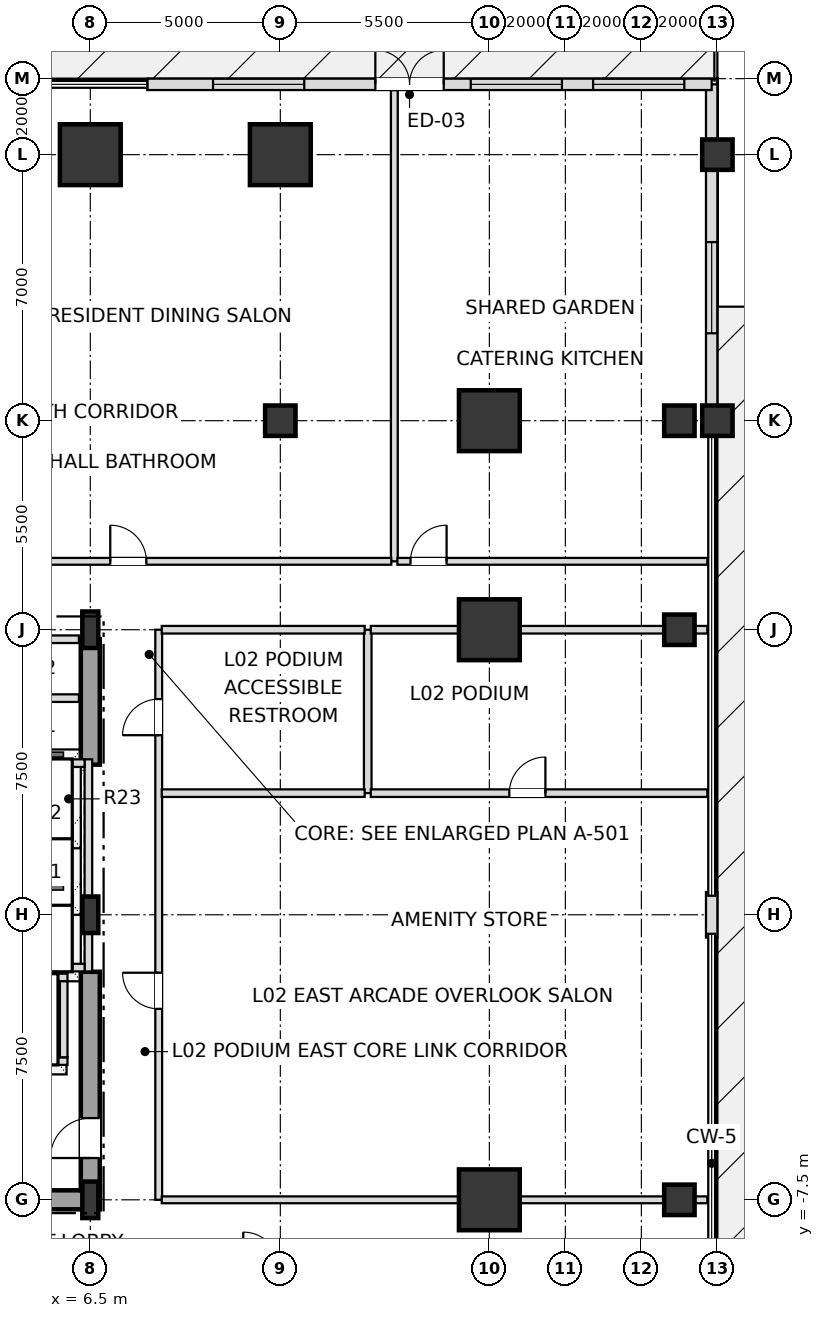
"""IFC4 building model, lengths in metres.
Left out: names, types, materials, properties, quantities, classifications, styles, units other than length and angle.
Written with IfcOpenShell. Run it as: python <this file> out.ifc"""

import sys

from ifc_helpers import new_model, si_unit, direction, frame, frame_2d, origin, origin_2d, place, context, subcontext, project, spatial, rectangle, i_section, extrude, element, fill, save


model = new_model("IFC4")
c1 = context("Model", 3, precision=1e-05, world=origin(), true_north=direction((0.0, 1.0)))
c2 = subcontext(c1, "Body", "Model", "MODEL_VIEW")
j1 = project(units=[si_unit("LENGTHUNIT", "METRE"), si_unit("PLANEANGLEUNIT", "RADIAN")], contexts=[c1])
p1 = place(None, origin())
s1 = spatial("IfcSite", under=j1, at=p1, CompositionType="ELEMENT")
p2 = place(p1, origin())
s2 = spatial("IfcBuilding", under=s1, at=p2, CompositionType="ELEMENT")
p3 = place(p2, frame((0.0, 0.0, 11.4)))
s3 = spatial("IfcBuildingStorey", under=s2, at=p3, CompositionType="ELEMENT", Elevation=11.4)
for number, where, z_axis, x_axis in (
    (1, (6.5, -7.5, 0.0), (0.0, 0.0, 1.0), (1.0, 0.0, 0.0)),
    (2, (6.5, 0.0, 0.0), (0.0, 0.0, 1.0), (1.0, 0.0, 0.0)),
    (3, (6.5, 7.5, 0.0), (0.0, 0.0, 1.0), (1.0, 0.0, 0.0)),
):
    element("IfcColumn", number, at=place(p3, frame(where, z_axis=z_axis, x_axis=x_axis)), inside=s3, PredefinedType="COLUMN", context=c2, shape_type="SweptSolid", body=[
        extrude(i_section(OverallWidth=0.42, OverallDepth=0.96, WebThickness=0.022, FlangeThickness=0.034, at=origin_2d()), origin(), (0.0, 0.0, 1.0), 5.4),
    ])
for number, where, z_axis, x_axis in (
    (4, (17.0, -7.5, 0.0), (0.0, 0.0, 1.0), (1.0, 0.0, 0.0)),
    (5, (17.0, 7.5, 0.0), (0.0, 0.0, 1.0), (1.0, 0.0, 0.0)),
    (6, (17.0, 13.0, 0.0), (0.0, 0.0, 1.0), (1.0, 0.0, 0.0)),
    (7, (11.5, 20.0, 0.0), (0.0, 0.0, 1.0), (1.0, 0.0, 0.0)),
    (8, (6.5, 20.0, 0.0), (0.0, 0.0, 1.0), (1.0, 0.0, 0.0)),
):
    element("IfcColumn", number, at=place(p3, frame(where, z_axis=z_axis, x_axis=x_axis)), inside=s3, PredefinedType="USERDEFINED", context=c2, shape_type="SweptSolid", body=[
        extrude(rectangle(XDim=1.6, YDim=1.6, at=origin_2d()), origin(), (0.0, 0.0, 1.0), 5.4),
    ])
for number, where, z_axis, x_axis in (
    (9, (23.0, 13.0, 0.0), (0.0, 0.0, 1.0), (1.0, 0.0, 0.0)),
    (10, (23.0, 20.0, 0.0), (0.0, 0.0, 1.0), (1.0, 0.0, 0.0)),
    (11, (11.5, 13.0, 0.0), (0.0, 0.0, 1.0), (1.0, 0.0, 0.0)),
    (12, (22.0, -7.5, 0.0), (0.0, 0.0, 1.0), (1.0, 0.0, 0.0)),
    (13, (22.0, 7.5, 0.0), (0.0, 0.0, 1.0), (1.0, 0.0, 0.0)),
    (14, (22.0, 13.0, 0.0), (0.0, 0.0, 1.0), (1.0, 0.0, 0.0)),
):
    element("IfcColumn", number, at=place(p3, frame(where, z_axis=z_axis, x_axis=x_axis)), inside=s3, PredefinedType="COLUMN", context=c2, shape_type="SweptSolid", body=[
        extrude(rectangle(XDim=0.8, YDim=0.8, at=origin_2d()), origin(), (0.0, 0.0, 1.0), 5.4),
    ])
p4 = place(p3, frame((22.85, -0.6, 0.0), z_axis=(0.0, 0.0, 1.0), x_axis=(0.0, 1.0, 0.0)))
e15 = element("IfcWall", 15, at=p4, inside=s3, PredefinedType="SOLIDWALL", context=c2, shape_type="SweptSolid", body=[
    extrude(rectangle(XDim=1.2, YDim=0.3, at=frame_2d((0.6, 0.0))), origin(), (0.0, 0.0, 1.0), 4.476),
])
p5 = place(p3, frame((22.85, 13.0, 0.0), z_axis=(0.0, 0.0, 1.0), x_axis=(0.0, 1.0, 0.0)))
e16 = element("IfcWall", 16, at=p5, inside=s3, PredefinedType="SOLIDWALL", context=c2, shape_type="SweptSolid", body=[
    extrude(rectangle(XDim=8.85, YDim=0.3, at=frame_2d((4.425, 0.0))), origin(), (0.0, 0.0, 1.0), 4.476),
])
p6 = place(p5, frame((2.3, 0.0, 0.8)))
e17 = element("IfcOpeningElement", 17, at=p6, cuts=e16, PredefinedType="OPENING", context=c2, shape_type="SweptSolid", body=[
    extrude(rectangle(XDim=2.4, YDim=2.2, at=frame_2d((1.2, 1.1))), frame((0.0, 0.16, 0.0), z_axis=(0.0, -1.0, 0.0), x_axis=(1.0, 0.0, 0.0)), (0.0, 0.0, 1.0), 0.32),
])
p7 = place(p3, frame((8.0, 21.85, 0.0), z_axis=(0.0, 0.0, 1.0), x_axis=(1.0, 0.0, 0.0)))
e18 = element("IfcWall", 18, at=p7, inside=s3, PredefinedType="SOLIDWALL", context=c2, shape_type="SweptSolid", body=[
    extrude(rectangle(XDim=14.85, YDim=0.3, at=frame_2d((7.425, 0.0))), origin(), (0.0, 0.0, 1.0), 5.12),
])
p8 = place(p7, frame((6.0, 0.0, 0.0)))
e19 = element("IfcOpeningElement", 19, at=p8, cuts=e18, PredefinedType="OPENING", context=c2, shape_type="SweptSolid", body=[
    extrude(rectangle(XDim=1.8, YDim=2.3, at=frame_2d((0.9, 1.15))), frame((0.0, 0.16, 0.0), z_axis=(0.0, -1.0, 0.0), x_axis=(1.0, 0.0, 0.0)), (0.0, 0.0, 1.0), 0.32),
])
p9 = place(p7, frame((1.73, 0.0, 0.8)))
e20 = element("IfcOpeningElement", 20, at=p9, cuts=e18, PredefinedType="OPENING", context=c2, shape_type="SweptSolid", body=[
    extrude(rectangle(XDim=2.4, YDim=2.2, at=frame_2d((1.2, 1.1))), frame((0.0, 0.16, 0.0), z_axis=(0.0, -1.0, 0.0), x_axis=(1.0, 0.0, 0.0)), (0.0, 0.0, 1.0), 0.32),
])
p10 = place(p7, frame((8.51, 0.0, 0.8)))
e21 = element("IfcOpeningElement", 21, at=p10, cuts=e18, PredefinedType="OPENING", context=c2, shape_type="SweptSolid", body=[
    extrude(rectangle(XDim=2.4, YDim=2.2, at=frame_2d((1.2, 1.1))), frame((0.0, 0.16, 0.0), z_axis=(0.0, -1.0, 0.0), x_axis=(1.0, 0.0, 0.0)), (0.0, 0.0, 1.0), 0.32),
])
p11 = place(p7, frame((11.73, 0.0, 0.8)))
e22 = element("IfcOpeningElement", 22, at=p11, cuts=e18, PredefinedType="OPENING", context=c2, shape_type="SweptSolid", body=[
    extrude(rectangle(XDim=2.4, YDim=2.2, at=frame_2d((1.2, 1.1))), frame((0.0, 0.16, 0.0), z_axis=(0.0, -1.0, 0.0), x_axis=(1.0, 0.0, 0.0)), (0.0, 0.0, 1.0), 0.32),
])
p12 = place(p3, frame((0.0, -7.5, 0.0), z_axis=(0.0, 0.0, 1.0), x_axis=(1.0, 0.0, 0.0)))
e23 = element("IfcWall", 23, at=p12, inside=s3, PredefinedType="SHEAR", context=c2, shape_type="SweptSolid", body=[
    extrude(rectangle(XDim=6.75, YDim=0.5, at=frame_2d((3.375, 0.0))), origin(), (0.0, 0.0, 1.0), 5.12),
])
p13 = place(p3, frame((6.5, -7.25, 0.0), z_axis=(0.0, 0.0, 1.0), x_axis=(0.0, 1.0, 0.0)))
e24 = element("IfcWall", 24, at=p13, inside=s3, PredefinedType="SHEAR", context=c2, shape_type="SweptSolid", body=[
    extrude(rectangle(XDim=5.75, YDim=0.5, at=frame_2d((2.875, 0.0))), origin(), (0.0, 0.0, 1.0), 5.12),
])
p14 = place(p13, frame((0.85, 0.0, 0.0)))
e25 = element("IfcOpeningElement", 25, at=p14, cuts=e24, PredefinedType="OPENING", context=c2, shape_type="SweptSolid", body=[
    extrude(rectangle(XDim=1.05, YDim=2.15, at=frame_2d((0.525, 1.075))), frame((0.0, 0.26, 0.0), z_axis=(0.0, -1.0, 0.0), x_axis=(1.0, 0.0, 0.0)), (0.0, 0.0, 1.0), 0.52),
])
p15 = place(p3, frame((6.5, 3.95, 0.0), z_axis=(0.0, 0.0, 1.0), x_axis=(0.0, 1.0, 0.0)))
e26 = element("IfcWall", 26, at=p15, inside=s3, PredefinedType="SHEAR", context=c2, shape_type="SweptSolid", body=[
    extrude(rectangle(XDim=3.3, YDim=0.5, at=frame_2d((1.65, 0.0))), origin(), (0.0, 0.0, 1.0), 5.12),
])
p16 = place(p3, frame((6.45, -1.49, 0.0), z_axis=(0.0, 0.0, 1.0), x_axis=(0.0, 1.0, 0.0)))
e27 = element("IfcWall", 27, at=p16, inside=s3, PredefinedType="SOLIDWALL", context=c2, shape_type="SweptSolid", body=[
    extrude(rectangle(XDim=5.58, YDim=0.2, at=frame_2d((2.79, 0.0))), origin(), (0.0, 0.0, 1.0), 4.41),
])
for number, where, z_axis, x_axis in (
    (28, (4.15, -1.39, 0.0), (0.0, 0.0, 1.0), (1.0, 0.0, 0.0)),
    (29, (4.15, 3.99, 0.0), (0.0, 0.0, 1.0), (1.0, 0.0, 0.0)),
):
    element("IfcWall", number, at=place(p3, frame(where, z_axis=z_axis, x_axis=x_axis)), inside=s3, PredefinedType="SOLIDWALL", context=c2, shape_type="SweptSolid", body=[
        extrude(rectangle(XDim=2.2, YDim=0.2, at=frame_2d((1.1, 0.0))), origin(), (0.0, 0.0, 1.0), 5.12),
    ])
p17 = place(p3, frame((1.8, -3.85, 0.0), z_axis=(0.0, 0.0, 1.0), x_axis=(1.0, 0.0, 0.0)))
e30 = element("IfcWall", 30, at=p17, inside=s3, PredefinedType="SOLIDWALL", context=c2, shape_type="SweptSolid", body=[
    extrude(rectangle(XDim=4.1, YDim=0.2, at=frame_2d((2.05, 0.0))), origin(), (0.0, 0.0, 1.0), 5.12),
])
p18 = place(p17, frame((0.45, 0.0, 0.0)))
e31 = element("IfcOpeningElement", 31, at=p18, cuts=e30, PredefinedType="OPENING", context=c2, shape_type="SweptSolid", body=[
    extrude(rectangle(XDim=1.2, YDim=2.2, at=frame_2d((0.6, 1.1))), frame((0.0, 0.11, 0.0), z_axis=(0.0, -1.0, 0.0), x_axis=(1.0, 0.0, 0.0)), (0.0, 0.0, 1.0), 0.22),
])
p19 = place(p17, frame((2.45, 0.0, 0.0)))
e32 = element("IfcOpeningElement", 32, at=p19, cuts=e30, PredefinedType="OPENING", context=c2, shape_type="SweptSolid", body=[
    extrude(rectangle(XDim=1.2, YDim=2.2, at=frame_2d((0.6, 1.1))), frame((0.0, 0.11, 0.0), z_axis=(0.0, -1.0, 0.0), x_axis=(1.0, 0.0, 0.0)), (0.0, 0.0, 1.0), 0.22),
])
p20 = place(p3, frame((1.8, -1.65, 0.0), z_axis=(0.0, 0.0, 1.0), x_axis=(1.0, 0.0, 0.0)))
e33 = element("IfcWall", 33, at=p20, inside=s3, PredefinedType="SOLIDWALL", context=c2, shape_type="SweptSolid", body=[
    extrude(rectangle(XDim=4.1, YDim=0.2, at=frame_2d((2.05, 0.0))), origin(), (0.0, 0.0, 1.0), 5.12),
])
p21 = place(p3, frame((5.8, -3.75, 0.0), z_axis=(0.0, 0.0, 1.0), x_axis=(0.0, 1.0, 0.0)))
e34 = element("IfcWall", 34, at=p21, inside=s3, PredefinedType="SOLIDWALL", context=c2, shape_type="SweptSolid", body=[
    extrude(rectangle(XDim=2.0, YDim=0.2, at=frame_2d((1.0, 0.0))), origin(), (0.0, 0.0, 1.0), 5.12),
])
p22 = place(p3, frame((8.3, -7.5, 0.0), z_axis=(0.0, 0.0, 1.0), x_axis=(0.0, 1.0, 0.0)))
e35 = element("IfcWall", 35, at=p22, inside=s3, PredefinedType="PARTITIONING", context=c2, shape_type="SweptSolid", body=[
    extrude(rectangle(XDim=15.0, YDim=0.18, at=frame_2d((7.5, 0.0))), origin(), (0.0, 0.0, 1.0), 5.12),
])
p23 = place(p22, frame((5.025, 0.0, 0.0)))
e36 = element("IfcOpeningElement", 36, at=p23, cuts=e35, PredefinedType="OPENING", context=c2, shape_type="SweptSolid", body=[
    extrude(rectangle(XDim=0.95, YDim=2.15, at=frame_2d((0.475, 1.075))), frame((0.0, 0.1, 0.0), z_axis=(0.0, -1.0, 0.0), x_axis=(1.0, 0.0, 0.0)), (0.0, 0.0, 1.0), 0.2),
])
p24 = place(p22, frame((12.225, 0.0, 0.0)))
e37 = element("IfcOpeningElement", 37, at=p24, cuts=e35, PredefinedType="OPENING", context=c2, shape_type="SweptSolid", body=[
    extrude(rectangle(XDim=0.95, YDim=2.15, at=frame_2d((0.475, 1.075))), frame((0.0, 0.1, 0.0), z_axis=(0.0, -1.0, 0.0), x_axis=(1.0, 0.0, 0.0)), (0.0, 0.0, 1.0), 0.2),
])
p25 = place(p3, frame((13.8, 3.2, 0.0), z_axis=(0.0, 0.0, 1.0), x_axis=(0.0, 1.0, 0.0)))
e38 = element("IfcWall", 38, at=p25, inside=s3, PredefinedType="SOLIDWALL", context=c2, shape_type="SweptSolid", body=[
    extrude(rectangle(XDim=4.3, YDim=0.2, at=frame_2d((2.15, 0.0))), origin(), (0.0, 0.0, 1.0), 5.12),
])
p26 = place(p3, frame((14.5, 9.3, 0.0), z_axis=(0.0, 0.0, 1.0), x_axis=(0.0, 1.0, 0.0)))
e39 = element("IfcWall", 39, at=p26, inside=s3, PredefinedType="PARTITIONING", context=c2, shape_type="SweptSolid", body=[
    extrude(rectangle(XDim=12.395, YDim=0.18, at=frame_2d((6.198, 0.0))), origin(), (0.0, 0.0, 1.0), 4.41),
])
p27 = place(p3, frame((8.38, -7.5, 0.0), z_axis=(0.0, 0.0, 1.0), x_axis=(1.0, 0.0, 0.0)))
e40 = element("IfcWall", 40, at=p27, inside=s3, PredefinedType="PARTITIONING", context=c2, shape_type="SweptSolid", body=[
    extrude(rectangle(XDim=14.355, YDim=0.18, at=frame_2d((7.178, 0.0))), origin(), (0.0, 0.0, 1.0), 4.41),
])
p28 = place(p3, frame((8.38, 3.2, 0.0), z_axis=(0.0, 0.0, 1.0), x_axis=(1.0, 0.0, 0.0)))
e41 = element("IfcWall", 41, at=p28, inside=s3, PredefinedType="SOLIDWALL", context=c2, shape_type="SweptSolid", body=[
    extrude(rectangle(XDim=5.34, YDim=0.2, at=frame_2d((2.67, 0.0))), origin(), (0.0, 0.0, 1.0), 4.642),
])
p29 = place(p3, frame((13.88, 3.2, 0.0), z_axis=(0.0, 0.0, 1.0), x_axis=(1.0, 0.0, 0.0)))
e42 = element("IfcWall", 42, at=p29, inside=s3, PredefinedType="SOLIDWALL", context=c2, shape_type="SweptSolid", body=[
    extrude(rectangle(XDim=8.855, YDim=0.2, at=frame_2d((4.428, 0.0))), origin(), (0.0, 0.0, 1.0), 4.41),
])
p30 = place(p29, frame((3.645, 0.0, 0.0)))
e43 = element("IfcOpeningElement", 43, at=p30, cuts=e42, PredefinedType="OPENING", context=c2, shape_type="SweptSolid", body=[
    extrude(rectangle(XDim=0.95, YDim=2.15, at=frame_2d((0.475, 1.075))), frame((0.0, 0.11, 0.0), z_axis=(0.0, -1.0, 0.0), x_axis=(1.0, 0.0, 0.0)), (0.0, 0.0, 1.0), 0.22),
])
p31 = place(p3, frame((4.13, 5.7, 0.0), z_axis=(0.0, 0.0, 1.0), x_axis=(1.0, 0.0, 0.0)))
e44 = element("IfcWall", 44, at=p31, inside=s3, PredefinedType="SOLIDWALL", context=c2, shape_type="SweptSolid", body=[
    extrude(rectangle(XDim=2.07, YDim=0.2, at=frame_2d((1.035, 0.0))), origin(), (0.0, 0.0, 1.0), 5.12),
])
p32 = place(p3, frame((4.13, 7.25, 0.0), z_axis=(0.0, 0.0, 1.0), x_axis=(1.0, 0.0, 0.0)))
e45 = element("IfcWall", 45, at=p32, inside=s3, PredefinedType="SOLIDWALL", context=c2, shape_type="SweptSolid", body=[
    extrude(rectangle(XDim=2.07, YDim=0.2, at=frame_2d((1.035, 0.0))), origin(), (0.0, 0.0, 1.0), 4.41),
])
p33 = place(p3, frame((8.38, 7.5, 0.0), z_axis=(0.0, 0.0, 1.0), x_axis=(1.0, 0.0, 0.0)))
e46 = element("IfcWall", 46, at=p33, inside=s3, PredefinedType="SOLIDWALL", context=c2, shape_type="SweptSolid", body=[
    extrude(rectangle(XDim=5.34, YDim=0.2, at=frame_2d((2.67, 0.0))), origin(), (0.0, 0.0, 1.0), 4.41),
])
p34 = place(p3, frame((13.88, 7.5, 0.0), z_axis=(0.0, 0.0, 1.0), x_axis=(1.0, 0.0, 0.0)))
e47 = element("IfcWall", 47, at=p34, inside=s3, PredefinedType="SOLIDWALL", context=c2, shape_type="SweptSolid", body=[
    extrude(rectangle(XDim=8.855, YDim=0.2, at=frame_2d((4.428, 0.0))), origin(), (0.0, 0.0, 1.0), 4.41),
])
p35 = place(p3, frame((0.08, 9.3, 0.0), z_axis=(0.0, 0.0, 1.0), x_axis=(1.0, 0.0, 0.0)))
e48 = element("IfcWall", 48, at=p35, inside=s3, PredefinedType="PARTITIONING", context=c2, shape_type="SweptSolid", body=[
    extrude(rectangle(XDim=14.34, YDim=0.18, at=frame_2d((7.17, 0.0))), origin(), (0.0, 0.0, 1.0), 4.41),
])
p36 = place(p35, frame((6.945, 0.0, 0.0)))
e49 = element("IfcOpeningElement", 49, at=p36, cuts=e48, PredefinedType="OPENING", context=c2, shape_type="SweptSolid", body=[
    extrude(rectangle(XDim=0.95, YDim=2.15, at=frame_2d((0.475, 1.075))), frame((0.0, 0.1, 0.0), z_axis=(0.0, -1.0, 0.0), x_axis=(1.0, 0.0, 0.0)), (0.0, 0.0, 1.0), 0.2),
])
p37 = place(p3, frame((14.58, 9.3, 0.0), z_axis=(0.0, 0.0, 1.0), x_axis=(1.0, 0.0, 0.0)))
e50 = element("IfcWall", 50, at=p37, inside=s3, PredefinedType="PARTITIONING", context=c2, shape_type="SweptSolid", body=[
    extrude(rectangle(XDim=8.155, YDim=0.18, at=frame_2d((4.078, 0.0))), origin(), (0.0, 0.0, 1.0), 4.41),
])
p38 = place(p37, frame((0.345, 0.0, 0.0)))
e51 = element("IfcOpeningElement", 51, at=p38, cuts=e50, PredefinedType="OPENING", context=c2, shape_type="SweptSolid", body=[
    extrude(rectangle(XDim=0.95, YDim=2.15, at=frame_2d((0.475, 1.075))), frame((0.0, 0.1, 0.0), z_axis=(0.0, -1.0, 0.0), x_axis=(1.0, 0.0, 0.0)), (0.0, 0.0, 1.0), 0.2),
])
p39 = place(p6, origin())
e52 = element("IfcWindow", 52, at=p39, inside=s3, PartitioningType="SINGLE_PANEL", PredefinedType="WINDOW", context=c2, shape_type="SweptSolid", body=[
    extrude(rectangle(XDim=2.4, YDim=2.2, at=frame_2d((1.2, 1.1))), frame((0.0, 0.03, 0.0), z_axis=(0.0, -1.0, 0.0), x_axis=(1.0, 0.0, 0.0)), (0.0, 0.0, 1.0), 0.06),
])
fill(e17, e52)
p40 = place(p8, origin())
e53 = element("IfcDoor", 53, at=p40, inside=s3, OperationType="DOUBLE_DOOR_SINGLE_SWING", PredefinedType="DOOR", context=c2, shape_type="SweptSolid", body=[
    extrude(rectangle(XDim=1.8, YDim=2.3, at=frame_2d((0.9, 1.15))), frame((0.0, 0.025, 0.0), z_axis=(0.0, -1.0, 0.0), x_axis=(1.0, 0.0, 0.0)), (0.0, 0.0, 1.0), 0.05),
])
fill(e19, e53)
p41 = place(p9, origin())
e54 = element("IfcWindow", 54, at=p41, inside=s3, PartitioningType="SINGLE_PANEL", PredefinedType="WINDOW", context=c2, shape_type="SweptSolid", body=[
    extrude(rectangle(XDim=2.4, YDim=2.2, at=frame_2d((1.2, 1.1))), frame((0.0, 0.03, 0.0), z_axis=(0.0, -1.0, 0.0), x_axis=(1.0, 0.0, 0.0)), (0.0, 0.0, 1.0), 0.06),
])
fill(e20, e54)
p42 = place(p10, origin())
e55 = element("IfcWindow", 55, at=p42, inside=s3, PartitioningType="SINGLE_PANEL", PredefinedType="WINDOW", context=c2, shape_type="SweptSolid", body=[
    extrude(rectangle(XDim=2.4, YDim=2.2, at=frame_2d((1.2, 1.1))), frame((0.0, 0.03, 0.0), z_axis=(0.0, -1.0, 0.0), x_axis=(1.0, 0.0, 0.0)), (0.0, 0.0, 1.0), 0.06),
])
fill(e21, e55)
p43 = place(p11, origin())
e56 = element("IfcWindow", 56, at=p43, inside=s3, PartitioningType="SINGLE_PANEL", PredefinedType="WINDOW", context=c2, shape_type="SweptSolid", body=[
    extrude(rectangle(XDim=2.4, YDim=2.2, at=frame_2d((1.2, 1.1))), frame((0.0, 0.03, 0.0), z_axis=(0.0, -1.0, 0.0), x_axis=(1.0, 0.0, 0.0)), (0.0, 0.0, 1.0), 0.06),
])
fill(e22, e56)
p44 = place(p14, origin())
e57 = element("IfcDoor", 57, at=p44, inside=s3, OperationType="SINGLE_SWING_LEFT", PredefinedType="DOOR", context=c2, shape_type="SweptSolid", body=[
    extrude(rectangle(XDim=1.05, YDim=2.15, at=frame_2d((0.525, 1.075))), frame((0.0, 0.025, 0.0), z_axis=(0.0, -1.0, 0.0), x_axis=(1.0, 0.0, 0.0)), (0.0, 0.0, 1.0), 0.05),
])
fill(e25, e57)
p45 = place(p36, origin())
e58 = element("IfcDoor", 58, at=p45, inside=s3, OperationType="SINGLE_SWING_LEFT", PredefinedType="DOOR", context=c2, shape_type="SweptSolid", body=[
    extrude(rectangle(XDim=0.95, YDim=2.15, at=frame_2d((0.475, 1.075))), frame((0.0, 0.025, 0.0), z_axis=(0.0, -1.0, 0.0), x_axis=(1.0, 0.0, 0.0)), (0.0, 0.0, 1.0), 0.05),
])
fill(e49, e58)
p46 = place(p38, origin())
e59 = element("IfcDoor", 59, at=p46, inside=s3, OperationType="SINGLE_SWING_RIGHT", PredefinedType="DOOR", context=c2, shape_type="SweptSolid", body=[
    extrude(rectangle(XDim=0.95, YDim=2.15, at=frame_2d((0.475, 1.075))), frame((0.0, 0.025, 0.0), z_axis=(0.0, -1.0, 0.0), x_axis=(1.0, 0.0, 0.0)), (0.0, 0.0, 1.0), 0.05),
])
fill(e51, e59)
p47 = place(p23, origin())
e60 = element("IfcDoor", 60, at=p47, inside=s3, OperationType="SINGLE_SWING_RIGHT", PredefinedType="DOOR", context=c2, shape_type="SweptSolid", body=[
    extrude(rectangle(XDim=0.95, YDim=2.15, at=frame_2d((0.475, 1.075))), frame((0.0, 0.025, 0.0), z_axis=(0.0, -1.0, 0.0), x_axis=(1.0, 0.0, 0.0)), (0.0, 0.0, 1.0), 0.05),
])
fill(e36, e60)
p48 = place(p24, origin())
e61 = element("IfcDoor", 61, at=p48, inside=s3, OperationType="SINGLE_SWING_LEFT", PredefinedType="DOOR", context=c2, shape_type="SweptSolid", body=[
    extrude(rectangle(XDim=0.95, YDim=2.15, at=frame_2d((0.475, 1.075))), frame((0.0, 0.025, 0.0), z_axis=(0.0, -1.0, 0.0), x_axis=(1.0, 0.0, 0.0)), (0.0, 0.0, 1.0), 0.05),
])
fill(e37, e61)
p49 = place(p30, origin())
e62 = element("IfcDoor", 62, at=p49, inside=s3, OperationType="SINGLE_SWING_RIGHT", PredefinedType="DOOR", context=c2, shape_type="SweptSolid", body=[
    extrude(rectangle(XDim=0.95, YDim=2.15, at=frame_2d((0.475, 1.075))), frame((0.0, 0.025, 0.0), z_axis=(0.0, -1.0, 0.0), x_axis=(1.0, 0.0, 0.0)), (0.0, 0.0, 1.0), 0.05),
])
fill(e43, e62)
save(model, sys.argv[1])
